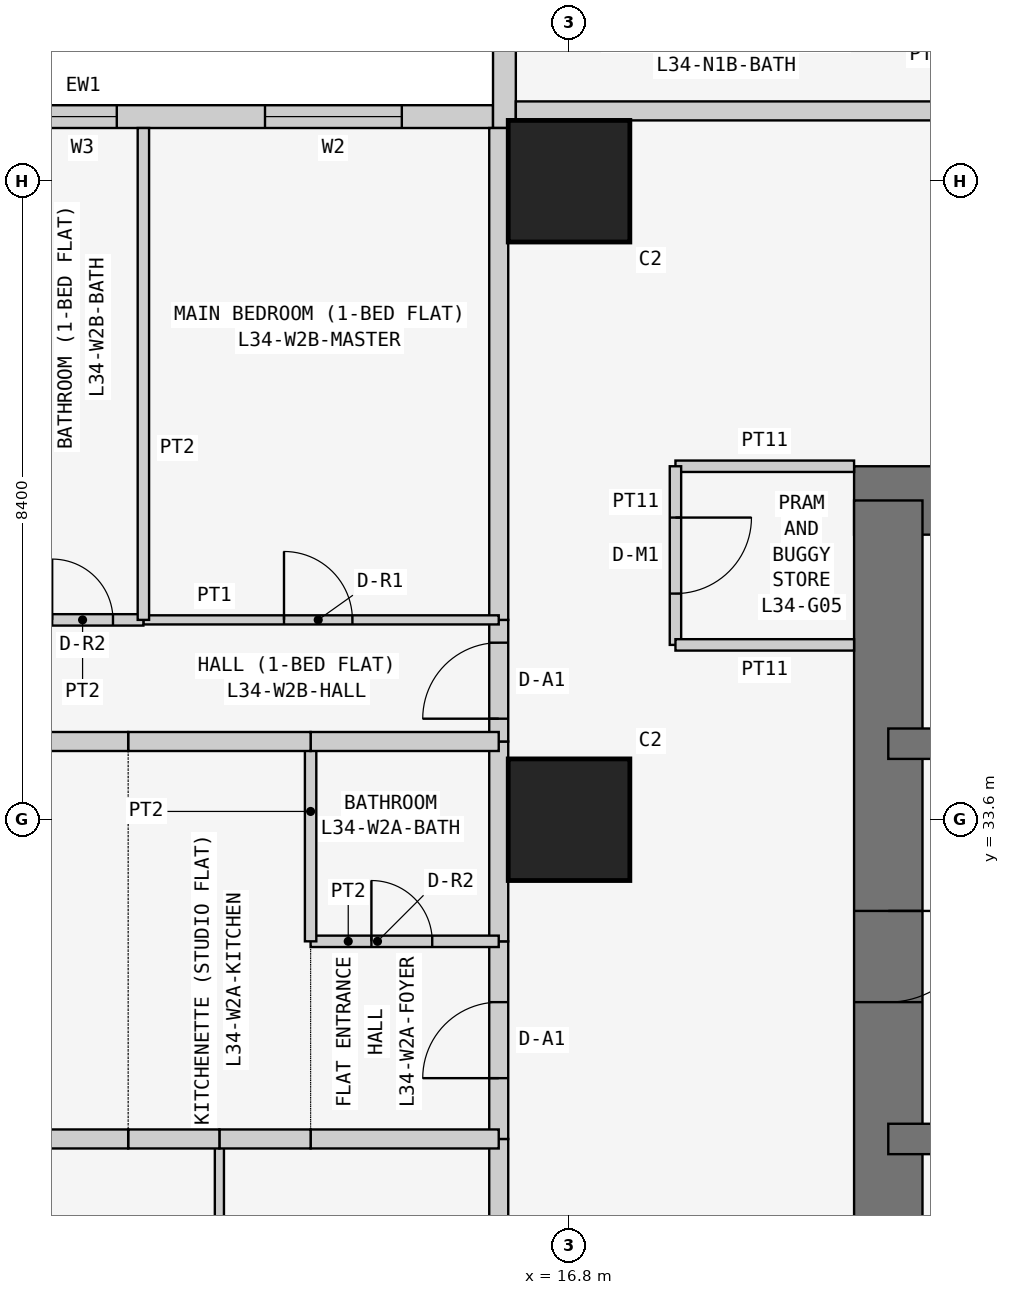
"""IFC4 building model, lengths in metres.
Left out: names, types, materials, properties, quantities, classifications, styles, units other than length and angle.
Written with IfcOpenShell. Run it as: python <this file> out.ifc"""

import sys

from ifc_helpers import new_model, si_unit, direction, frame, frame_2d, origin, origin_2d, place, context, subcontext, project, spatial, rectangle, extrude, element, fill, save


model = new_model("IFC4")
c1 = context("Model", 3, precision=1e-05, world=origin(), true_north=direction((0.0, 1.0)))
c2 = subcontext(c1, "Body", "Model", "MODEL_VIEW")
j1 = project(units=[si_unit("LENGTHUNIT", "METRE"), si_unit("PLANEANGLEUNIT", "RADIAN")], contexts=[c1])
p1 = place(None, origin())
s1 = spatial("IfcSite", under=j1, at=p1, CompositionType="ELEMENT")
p2 = place(p1, origin())
s2 = spatial("IfcBuilding", under=s1, at=p2, CompositionType="ELEMENT")
p3 = place(p2, frame((0.0, 0.0, 134.1)))
s3 = spatial("IfcBuildingStorey", under=s2, at=p3, CompositionType="ELEMENT", Elevation=134.1)
for number, where, z_axis, x_axis in (
    (1, (16.8, 33.6, 0.0), (0.0, 0.0, 1.0), (1.0, 0.0, 0.0)),
    (2, (16.8, 42.0, 0.0), (0.0, 0.0, 1.0), (1.0, 0.0, 0.0)),
):
    element("IfcColumn", number, at=place(p3, frame(where, z_axis=z_axis, x_axis=x_axis)), inside=s3, PredefinedType="COLUMN", context=c2, shape_type="SweptSolid", body=[
        extrude(rectangle(XDim=1.6, YDim=1.6, at=origin_2d()), origin(), (0.0, 0.0, 1.0), 3.6),
    ])
p4 = place(p3, frame((37.8, 37.8, 0.0), z_axis=(0.0, 0.0, 1.0), x_axis=(-1.0, 0.0, 0.0)))
e3 = element("IfcWall", 3, at=p4, inside=s3, PredefinedType="SHEAR", context=c2, shape_type="SweptSolid", body=[
    extrude(rectangle(XDim=17.25, YDim=0.9, at=frame_2d((8.625, 0.0))), origin(), (0.0, 0.0, 1.0), 3.6),
])
p5 = place(p3, frame((21.0, 37.8, 0.0), z_axis=(0.0, 0.0, 1.0), x_axis=(0.0, -1.0, 0.0)))
e4 = element("IfcWall", 4, at=p5, inside=s3, PredefinedType="SHEAR", context=c2, shape_type="SweptSolid", body=[
    extrude(rectangle(XDim=17.25, YDim=0.9, at=frame_2d((8.625, 0.0))), origin(), (0.0, 0.0, 1.0), 3.6),
])
p6 = place(p5, frame((5.4, 0.0, 0.0)))
e5 = element("IfcOpeningElement", 5, at=p6, cuts=e4, PredefinedType="OPENING", context=c2, shape_type="SweptSolid", body=[
    extrude(rectangle(XDim=1.2, YDim=2.1, at=frame_2d((0.6, 1.05))), frame((0.0, 0.46, 0.0), z_axis=(0.0, -1.0, 0.0), x_axis=(1.0, 0.0, 0.0)), (0.0, 0.0, 1.0), 0.92),
])
p7 = place(p3, frame((21.0, 29.4, 0.0), z_axis=(0.0, 0.0, 1.0), x_axis=(1.0, 0.0, 0.0)))
e6 = element("IfcWall", 6, at=p7, inside=s3, PredefinedType="SHEAR", context=c2, shape_type="SweptSolid", body=[
    extrude(rectangle(XDim=5.6, YDim=0.4, at=frame_2d((2.8, 0.0))), origin(), (0.0, 0.0, 1.0), 3.6),
])
p8 = place(p7, frame((2.3, 0.0, 0.0)))
e7 = element("IfcOpeningElement", 7, at=p8, cuts=e6, PredefinedType="OPENING", context=c2, shape_type="SweptSolid", body=[
    extrude(rectangle(XDim=1.2, YDim=2.1, at=frame_2d((0.6, 1.05))), frame((0.0, 0.21, 0.0), z_axis=(0.0, -1.0, 0.0), x_axis=(1.0, 0.0, 0.0)), (0.0, 0.0, 1.0), 0.42),
])
p9 = place(p3, frame((21.0, 34.6, 0.0), z_axis=(0.0, 0.0, 1.0), x_axis=(1.0, 0.0, 0.0)))
e8 = element("IfcWall", 8, at=p9, inside=s3, PredefinedType="SHEAR", context=c2, shape_type="SweptSolid", body=[
    extrude(rectangle(XDim=11.2, YDim=0.4, at=frame_2d((5.6, 0.0))), origin(), (0.0, 0.0, 1.0), 3.6),
])
p10 = place(p9, frame((9.35, 0.0, 0.0)))
e9 = element("IfcOpeningElement", 9, at=p10, cuts=e8, PredefinedType="OPENING", context=c2, shape_type="SweptSolid", body=[
    extrude(rectangle(XDim=0.9, YDim=2.1, at=frame_2d((0.45, 1.05))), frame((0.0, 0.21, 0.0), z_axis=(0.0, -1.0, 0.0), x_axis=(1.0, 0.0, 0.0)), (0.0, 0.0, 1.0), 0.42),
])
p11 = place(p9, frame((1.0, 0.0, 0.0)))
e10 = element("IfcOpeningElement", 10, at=p11, cuts=e8, PredefinedType="OPENING", context=c2, shape_type="SweptSolid", body=[
    extrude(rectangle(XDim=1.1, YDim=2.1, at=frame_2d((0.55, 1.05))), frame((0.0, 0.21, 0.0), z_axis=(0.0, -1.0, 0.0), x_axis=(1.0, 0.0, 0.0)), (0.0, 0.0, 1.0), 0.42),
])
p12 = place(p9, frame((3.65, 0.0, 0.0)))
e11 = element("IfcOpeningElement", 11, at=p12, cuts=e8, PredefinedType="OPENING", context=c2, shape_type="SweptSolid", body=[
    extrude(rectangle(XDim=1.1, YDim=2.1, at=frame_2d((0.55, 1.05))), frame((0.0, 0.21, 0.0), z_axis=(0.0, -1.0, 0.0), x_axis=(1.0, 0.0, 0.0)), (0.0, 0.0, 1.0), 0.42),
])
p13 = place(p9, frame((6.35, 0.0, 0.0)))
e12 = element("IfcOpeningElement", 12, at=p13, cuts=e8, PredefinedType="OPENING", context=c2, shape_type="SweptSolid", body=[
    extrude(rectangle(XDim=1.3, YDim=2.1, at=frame_2d((0.65, 1.05))), frame((0.0, 0.21, 0.0), z_axis=(0.0, -1.0, 0.0), x_axis=(1.0, 0.0, 0.0)), (0.0, 0.0, 1.0), 0.42),
])
p14 = place(p3, frame((15.8, 42.85, 0.0), z_axis=(0.0, 0.0, 1.0), x_axis=(-1.0, 0.0, 0.0)))
e13 = element("IfcWall", 13, at=p14, inside=s3, PredefinedType="SOLIDWALL", context=c2, shape_type="SweptSolid", body=[
    extrude(rectangle(XDim=15.4, YDim=0.3, at=frame_2d((7.7, 0.0))), origin(), (0.0, 0.0, 1.0), 3.45),
])
p15 = place(p14, frame((1.2, 0.0, 0.9)))
e14 = element("IfcOpeningElement", 14, at=p15, cuts=e13, PredefinedType="OPENING", context=c2, shape_type="SweptSolid", body=[
    extrude(rectangle(XDim=1.8, YDim=1.5, at=frame_2d((0.9, 0.75))), frame((0.0, 0.16, 0.0), z_axis=(0.0, -1.0, 0.0), x_axis=(1.0, 0.0, 0.0)), (0.0, 0.0, 1.0), 0.32),
])
p16 = place(p14, frame((4.95, 0.0, 1.5)))
e15 = element("IfcOpeningElement", 15, at=p16, cuts=e13, PredefinedType="OPENING", context=c2, shape_type="SweptSolid", body=[
    extrude(rectangle(XDim=0.9, YDim=0.7, at=frame_2d((0.45, 0.35))), frame((0.0, 0.16, 0.0), z_axis=(0.0, -1.0, 0.0), x_axis=(1.0, 0.0, 0.0)), (0.0, 0.0, 1.0), 0.32),
])
p17 = place(p14, frame((8.5, 0.0, 0.9)))
e16 = element("IfcOpeningElement", 16, at=p17, cuts=e13, PredefinedType="OPENING", context=c2, shape_type="SweptSolid", body=[
    extrude(rectangle(XDim=1.8, YDim=1.5, at=frame_2d((0.9, 0.75))), frame((0.0, 0.16, 0.0), z_axis=(0.0, -1.0, 0.0), x_axis=(1.0, 0.0, 0.0)), (0.0, 0.0, 1.0), 0.32),
])
p18 = place(p14, frame((12.5, 0.0, 0.0)))
e17 = element("IfcOpeningElement", 17, at=p18, cuts=e13, PredefinedType="OPENING", context=c2, shape_type="SweptSolid", body=[
    extrude(rectangle(XDim=0.9, YDim=2.4, at=frame_2d((0.45, 1.2))), frame((0.0, 0.16, 0.0), z_axis=(0.0, -1.0, 0.0), x_axis=(1.0, 0.0, 0.0)), (0.0, 0.0, 1.0), 0.32),
])
p19 = place(p14, frame((13.5, 0.0, 0.9)))
e18 = element("IfcOpeningElement", 18, at=p19, cuts=e13, PredefinedType="OPENING", context=c2, shape_type="SweptSolid", body=[
    extrude(rectangle(XDim=1.2, YDim=1.5, at=frame_2d((0.6, 0.75))), frame((0.0, 0.16, 0.0), z_axis=(0.0, -1.0, 0.0), x_axis=(1.0, 0.0, 0.0)), (0.0, 0.0, 1.0), 0.32),
])
p20 = place(p3, frame((15.95, 50.0, 0.0), z_axis=(0.0, 0.0, 1.0), x_axis=(0.0, -1.0, 0.0)))
e19 = element("IfcWall", 19, at=p20, inside=s3, PredefinedType="SOLIDWALL", context=c2, shape_type="SweptSolid", body=[
    extrude(rectangle(XDim=7.3, YDim=0.3, at=frame_2d((3.65, 0.0))), origin(), (0.0, 0.0, 1.0), 3.45),
])
p21 = place(p20, frame((3.1, 0.0, 0.9)))
e20 = element("IfcOpeningElement", 20, at=p21, cuts=e19, PredefinedType="OPENING", context=c2, shape_type="SweptSolid", body=[
    extrude(rectangle(XDim=2.4, YDim=1.5, at=frame_2d((1.2, 0.75))), frame((0.0, 0.16, 0.0), z_axis=(0.0, -1.0, 0.0), x_axis=(1.0, 0.0, 0.0)), (0.0, 0.0, 1.0), 0.32),
])
p22 = place(p20, frame((0.75, 0.0, 0.9)))
e21 = element("IfcOpeningElement", 21, at=p22, cuts=e19, PredefinedType="OPENING", context=c2, shape_type="SweptSolid", body=[
    extrude(rectangle(XDim=1.2, YDim=1.5, at=frame_2d((0.6, 0.75))), frame((0.0, 0.16, 0.0), z_axis=(0.0, -1.0, 0.0), x_axis=(1.0, 0.0, 0.0)), (0.0, 0.0, 1.0), 0.32),
])
p23 = place(p3, frame((20.55, 38.25, 0.0), z_axis=(0.0, 0.0, 1.0), x_axis=(-1.0, 0.0, 0.0)))
e22 = element("IfcWall", 22, at=p23, inside=s3, PredefinedType="PARTITIONING", context=c2, shape_type="SweptSolid", body=[
    extrude(rectangle(XDim=2.35, YDim=0.15, at=frame_2d((1.175, 0.0))), origin(), (0.0, 0.0, 1.0), 3.45),
])
p24 = place(p3, frame((18.2, 38.25, 0.0), z_axis=(0.0, 0.0, 1.0), x_axis=(0.0, -1.0, 0.0)))
e23 = element("IfcWall", 23, at=p24, inside=s3, PredefinedType="PARTITIONING", context=c2, shape_type="SweptSolid", body=[
    extrude(rectangle(XDim=2.35, YDim=0.15, at=frame_2d((1.175, 0.0))), origin(), (0.0, 0.0, 1.0), 3.45),
])
p25 = place(p24, frame((0.675, 0.0, 0.0)))
e24 = element("IfcOpeningElement", 24, at=p25, cuts=e23, PredefinedType="OPENING", context=c2, shape_type="SweptSolid", body=[
    extrude(rectangle(XDim=1.0, YDim=2.1, at=frame_2d((0.5, 1.05))), frame((0.0, 0.085, 0.0), z_axis=(0.0, -1.0, 0.0), x_axis=(1.0, 0.0, 0.0)), (0.0, 0.0, 1.0), 0.17),
])
p26 = place(p3, frame((18.2, 35.9, 0.0), z_axis=(0.0, 0.0, 1.0), x_axis=(1.0, 0.0, 0.0)))
e25 = element("IfcWall", 25, at=p26, inside=s3, PredefinedType="PARTITIONING", context=c2, shape_type="SweptSolid", body=[
    extrude(rectangle(XDim=2.35, YDim=0.15, at=frame_2d((1.175, 0.0))), origin(), (0.0, 0.0, 1.0), 3.45),
])
p27 = place(p3, frame((16.1, 42.925, 0.0), z_axis=(0.0, 0.0, 1.0), x_axis=(1.0, 0.0, 0.0)))
e26 = element("IfcWall", 26, at=p27, inside=s3, PredefinedType="PARTITIONING", context=c2, shape_type="SweptSolid", body=[
    extrude(rectangle(XDim=6.471, YDim=0.25, at=frame_2d((3.235, 0.0))), origin(), (0.0, 0.0, 1.0), 3.45),
])
p28 = place(p3, frame((15.875, 24.171, 0.0), z_axis=(0.0, 0.0, 1.0), x_axis=(0.0, 1.0, 0.0)))
e27 = element("IfcWall", 27, at=p28, inside=s3, PredefinedType="PARTITIONING", context=c2, shape_type="SweptSolid", body=[
    extrude(rectangle(XDim=5.229, YDim=0.25, at=frame_2d((2.615, 0.0))), origin(), (0.0, 0.0, 1.0), 3.45),
])
p29 = place(p28, frame((2.129, 0.0, 0.0)))
e28 = element("IfcOpeningElement", 28, at=p29, cuts=e27, PredefinedType="OPENING", context=c2, shape_type="SweptSolid", body=[
    extrude(rectangle(XDim=1.0, YDim=2.1, at=frame_2d((0.5, 1.05))), frame((0.0, 0.135, 0.0), z_axis=(0.0, -1.0, 0.0), x_axis=(1.0, 0.0, 0.0)), (0.0, 0.0, 1.0), 0.27),
])
p30 = place(p3, frame((15.875, 29.4, 0.0), z_axis=(0.0, 0.0, 1.0), x_axis=(0.0, 1.0, 0.0)))
e29 = element("IfcWall", 29, at=p30, inside=s3, PredefinedType="PARTITIONING", context=c2, shape_type="SweptSolid", body=[
    extrude(rectangle(XDim=2.6, YDim=0.25, at=frame_2d((1.3, 0.0))), origin(), (0.0, 0.0, 1.0), 3.45),
])
p31 = place(p30, frame((0.8, 0.0, 0.0)))
e30 = element("IfcOpeningElement", 30, at=p31, cuts=e29, PredefinedType="OPENING", context=c2, shape_type="SweptSolid", body=[
    extrude(rectangle(XDim=1.0, YDim=2.1, at=frame_2d((0.5, 1.05))), frame((0.0, 0.135, 0.0), z_axis=(0.0, -1.0, 0.0), x_axis=(1.0, 0.0, 0.0)), (0.0, 0.0, 1.0), 0.27),
])
p32 = place(p3, frame((15.875, 32.0, 0.0), z_axis=(0.0, 0.0, 1.0), x_axis=(0.0, 1.0, 0.0)))
e31 = element("IfcWall", 31, at=p32, inside=s3, PredefinedType="PARTITIONING", context=c2, shape_type="SweptSolid", body=[
    extrude(rectangle(XDim=2.629, YDim=0.25, at=frame_2d((1.314, 0.0))), origin(), (0.0, 0.0, 1.0), 3.45),
])
p33 = place(p3, frame((15.875, 34.629, 0.0), z_axis=(0.0, 0.0, 1.0), x_axis=(0.0, 1.0, 0.0)))
e32 = element("IfcWall", 32, at=p33, inside=s3, PredefinedType="PARTITIONING", context=c2, shape_type="SweptSolid", body=[
    extrude(rectangle(XDim=1.6, YDim=0.25, at=frame_2d((0.8, 0.0))), origin(), (0.0, 0.0, 1.0), 3.45),
])
p34 = place(p33, frame((0.3, 0.0, 0.0)))
e33 = element("IfcOpeningElement", 33, at=p34, cuts=e32, PredefinedType="OPENING", context=c2, shape_type="SweptSolid", body=[
    extrude(rectangle(XDim=1.0, YDim=2.1, at=frame_2d((0.5, 1.05))), frame((0.0, 0.135, 0.0), z_axis=(0.0, -1.0, 0.0), x_axis=(1.0, 0.0, 0.0)), (0.0, 0.0, 1.0), 0.27),
])
p35 = place(p3, frame((15.875, 36.229, 0.0), z_axis=(0.0, 0.0, 1.0), x_axis=(0.0, 1.0, 0.0)))
e34 = element("IfcWall", 34, at=p35, inside=s3, PredefinedType="PARTITIONING", context=c2, shape_type="SweptSolid", body=[
    extrude(rectangle(XDim=6.471, YDim=0.25, at=frame_2d((3.235, 0.0))), origin(), (0.0, 0.0, 1.0), 3.45),
])
p36 = place(p3, frame((12.2, 29.4, 0.0), z_axis=(0.0, 0.0, 1.0), x_axis=(0.0, -1.0, 0.0)))
e35 = element("IfcWall", 35, at=p36, inside=s3, PredefinedType="PARTITIONING", context=c2, shape_type="SweptSolid", body=[
    extrude(rectangle(XDim=5.229, YDim=0.12, at=frame_2d((2.615, 0.0))), origin(), (0.0, 0.0, 1.0), 3.45),
])
p37 = place(p3, frame((15.875, 29.4, 0.0), z_axis=(0.0, 0.0, 1.0), x_axis=(-1.0, 0.0, 0.0)))
e36 = element("IfcWall", 36, at=p37, inside=s3, PredefinedType="PARTITIONING", context=c2, shape_type="SweptSolid", body=[
    extrude(rectangle(XDim=2.475, YDim=0.25, at=frame_2d((1.238, 0.0))), origin(), (0.0, 0.0, 1.0), 3.45),
])
for number, where, z_axis, x_axis in (
    (37, (13.4, 29.4, 0.0), (0.0, 0.0, 1.0), (-1.0, 0.0, 0.0)),
    (38, (12.2, 29.4, 0.0), (0.0, 0.0, 1.0), (-1.0, 0.0, 0.0)),
    (39, (11.0, 29.4, 0.0), (0.0, 0.0, 1.0), (-1.0, 0.0, 0.0)),
):
    element("IfcWall", number, at=place(p3, frame(where, z_axis=z_axis, x_axis=x_axis)), inside=s3, PredefinedType="PARTITIONING", context=c2, shape_type="SweptSolid", body=[
        extrude(rectangle(XDim=1.2, YDim=0.25, at=frame_2d((0.6, 0.0))), origin(), (0.0, 0.0, 1.0), 3.45),
    ])
p38 = place(p3, frame((13.4, 32.0, 0.0), z_axis=(0.0, 0.0, 1.0), x_axis=(1.0, 0.0, 0.0)))
e40 = element("IfcWall", 40, at=p38, inside=s3, PredefinedType="PARTITIONING", context=c2, shape_type="SweptSolid", body=[
    extrude(rectangle(XDim=2.475, YDim=0.15, at=frame_2d((1.238, 0.0))), origin(), (0.0, 0.0, 1.0), 3.45),
])
p39 = place(p38, frame((0.8, 0.0, 0.0)))
e41 = element("IfcOpeningElement", 41, at=p39, cuts=e40, PredefinedType="OPENING", context=c2, shape_type="SweptSolid", body=[
    extrude(rectangle(XDim=0.8, YDim=2.1, at=frame_2d((0.4, 1.05))), frame((0.0, 0.085, 0.0), z_axis=(0.0, -1.0, 0.0), x_axis=(1.0, 0.0, 0.0)), (0.0, 0.0, 1.0), 0.17),
])
p40 = place(p3, frame((13.4, 32.0, 0.0), z_axis=(0.0, 0.0, 1.0), x_axis=(0.0, 1.0, 0.0)))
e42 = element("IfcWall", 42, at=p40, inside=s3, PredefinedType="PARTITIONING", context=c2, shape_type="SweptSolid", body=[
    extrude(rectangle(XDim=2.629, YDim=0.15, at=frame_2d((1.314, 0.0))), origin(), (0.0, 0.0, 1.0), 3.45),
])
p41 = place(p3, frame((13.4, 34.629, 0.0), z_axis=(0.0, 0.0, 1.0), x_axis=(1.0, 0.0, 0.0)))
e43 = element("IfcWall", 43, at=p41, inside=s3, PredefinedType="PARTITIONING", context=c2, shape_type="SweptSolid", body=[
    extrude(rectangle(XDim=2.475, YDim=0.25, at=frame_2d((1.238, 0.0))), origin(), (0.0, 0.0, 1.0), 3.45),
])
p42 = place(p3, frame((11.0, 34.629, 0.0), z_axis=(0.0, 0.0, 1.0), x_axis=(1.0, 0.0, 0.0)))
e44 = element("IfcWall", 44, at=p42, inside=s3, PredefinedType="PARTITIONING", context=c2, shape_type="SweptSolid", body=[
    extrude(rectangle(XDim=2.4, YDim=0.25, at=frame_2d((1.2, 0.0))), origin(), (0.0, 0.0, 1.0), 3.45),
])
p43 = place(p3, frame((3.5, 34.629, 0.0), z_axis=(0.0, 0.0, 1.0), x_axis=(1.0, 0.0, 0.0)))
e45 = element("IfcWall", 45, at=p43, inside=s3, PredefinedType="PARTITIONING", context=c2, shape_type="SweptSolid", body=[
    extrude(rectangle(XDim=7.5, YDim=0.25, at=frame_2d((3.75, 0.0))), origin(), (0.0, 0.0, 1.0), 3.45),
])
p44 = place(p3, frame((11.2, 36.229, 0.0), z_axis=(0.0, 0.0, 1.0), x_axis=(1.0, 0.0, 0.0)))
e46 = element("IfcWall", 46, at=p44, inside=s3, PredefinedType="PARTITIONING", context=c2, shape_type="SweptSolid", body=[
    extrude(rectangle(XDim=4.675, YDim=0.12, at=frame_2d((2.337, 0.0))), origin(), (0.0, 0.0, 1.0), 3.45),
])
p45 = place(p44, frame((1.85, 0.0, 0.0)))
e47 = element("IfcOpeningElement", 47, at=p45, cuts=e46, PredefinedType="OPENING", context=c2, shape_type="SweptSolid", body=[
    extrude(rectangle(XDim=0.9, YDim=2.1, at=frame_2d((0.45, 1.05))), frame((0.0, 0.07, 0.0), z_axis=(0.0, -1.0, 0.0), x_axis=(1.0, 0.0, 0.0)), (0.0, 0.0, 1.0), 0.14),
])
p46 = place(p3, frame((9.6, 36.229, 0.0), z_axis=(0.0, 0.0, 1.0), x_axis=(1.0, 0.0, 0.0)))
e48 = element("IfcWall", 48, at=p46, inside=s3, PredefinedType="PARTITIONING", context=c2, shape_type="SweptSolid", body=[
    extrude(rectangle(XDim=1.6, YDim=0.15, at=frame_2d((0.8, 0.0))), origin(), (0.0, 0.0, 1.0), 3.45),
])
p47 = place(p46, frame((0.4, 0.0, 0.0)))
e49 = element("IfcOpeningElement", 49, at=p47, cuts=e48, PredefinedType="OPENING", context=c2, shape_type="SweptSolid", body=[
    extrude(rectangle(XDim=0.8, YDim=2.1, at=frame_2d((0.4, 1.05))), frame((0.0, 0.085, 0.0), z_axis=(0.0, -1.0, 0.0), x_axis=(1.0, 0.0, 0.0)), (0.0, 0.0, 1.0), 0.17),
])
p48 = place(p3, frame((11.2, 36.229, 0.0), z_axis=(0.0, 0.0, 1.0), x_axis=(0.0, 1.0, 0.0)))
e50 = element("IfcWall", 50, at=p48, inside=s3, PredefinedType="PARTITIONING", context=c2, shape_type="SweptSolid", body=[
    extrude(rectangle(XDim=6.471, YDim=0.15, at=frame_2d((3.235, 0.0))), origin(), (0.0, 0.0, 1.0), 3.45),
])
p49 = place(p15, origin())
e51 = element("IfcWindow", 51, at=p49, inside=s3, PartitioningType="SINGLE_PANEL", PredefinedType="WINDOW", context=c2, shape_type="SweptSolid", body=[
    extrude(rectangle(XDim=1.8, YDim=1.5, at=frame_2d((0.9, 0.75))), frame((0.0, 0.03, 0.0), z_axis=(0.0, -1.0, 0.0), x_axis=(1.0, 0.0, 0.0)), (0.0, 0.0, 1.0), 0.06),
])
fill(e14, e51)
p50 = place(p16, origin())
e52 = element("IfcWindow", 52, at=p50, inside=s3, PartitioningType="SINGLE_PANEL", PredefinedType="WINDOW", context=c2, shape_type="SweptSolid", body=[
    extrude(rectangle(XDim=0.9, YDim=0.7, at=frame_2d((0.45, 0.35))), frame((0.0, 0.03, 0.0), z_axis=(0.0, -1.0, 0.0), x_axis=(1.0, 0.0, 0.0)), (0.0, 0.0, 1.0), 0.06),
])
fill(e15, e52)
p51 = place(p25, origin())
e53 = element("IfcDoor", 53, at=p51, inside=s3, OperationType="SINGLE_SWING_LEFT", PredefinedType="DOOR", context=c2, shape_type="SweptSolid", body=[
    extrude(rectangle(XDim=1.0, YDim=2.1, at=frame_2d((0.5, 1.05))), frame((0.0, 0.025, 0.0), z_axis=(0.0, -1.0, 0.0), x_axis=(1.0, 0.0, 0.0)), (0.0, 0.0, 1.0), 0.05),
])
fill(e24, e53)
p52 = place(p31, origin())
e54 = element("IfcDoor", 54, at=p52, inside=s3, OperationType="SINGLE_SWING_LEFT", PredefinedType="DOOR", context=c2, shape_type="SweptSolid", body=[
    extrude(rectangle(XDim=1.0, YDim=2.1, at=frame_2d((0.5, 1.05))), frame((0.0, 0.025, 0.0), z_axis=(0.0, -1.0, 0.0), x_axis=(1.0, 0.0, 0.0)), (0.0, 0.0, 1.0), 0.05),
])
fill(e30, e54)
p53 = place(p39, origin())
e55 = element("IfcDoor", 55, at=p53, inside=s3, OperationType="SINGLE_SWING_LEFT", PredefinedType="DOOR", context=c2, shape_type="SweptSolid", body=[
    extrude(rectangle(XDim=0.8, YDim=2.1, at=frame_2d((0.4, 1.05))), frame((0.0, 0.025, 0.0), z_axis=(0.0, -1.0, 0.0), x_axis=(1.0, 0.0, 0.0)), (0.0, 0.0, 1.0), 0.05),
])
fill(e41, e55)
p54 = place(p34, origin())
e56 = element("IfcDoor", 56, at=p54, inside=s3, OperationType="SINGLE_SWING_LEFT", PredefinedType="DOOR", context=c2, shape_type="SweptSolid", body=[
    extrude(rectangle(XDim=1.0, YDim=2.1, at=frame_2d((0.5, 1.05))), frame((0.0, 0.025, 0.0), z_axis=(0.0, -1.0, 0.0), x_axis=(1.0, 0.0, 0.0)), (0.0, 0.0, 1.0), 0.05),
])
fill(e33, e56)
p55 = place(p45, origin())
e57 = element("IfcDoor", 57, at=p55, inside=s3, OperationType="SINGLE_SWING_LEFT", PredefinedType="DOOR", context=c2, shape_type="SweptSolid", body=[
    extrude(rectangle(XDim=0.9, YDim=2.1, at=frame_2d((0.45, 1.05))), frame((0.0, 0.025, 0.0), z_axis=(0.0, -1.0, 0.0), x_axis=(1.0, 0.0, 0.0)), (0.0, 0.0, 1.0), 0.05),
])
fill(e47, e57)
p56 = place(p47, origin())
e58 = element("IfcDoor", 58, at=p56, inside=s3, OperationType="SINGLE_SWING_LEFT", PredefinedType="DOOR", context=c2, shape_type="SweptSolid", body=[
    extrude(rectangle(XDim=0.8, YDim=2.1, at=frame_2d((0.4, 1.05))), frame((0.0, 0.025, 0.0), z_axis=(0.0, -1.0, 0.0), x_axis=(1.0, 0.0, 0.0)), (0.0, 0.0, 1.0), 0.05),
])
fill(e49, e58)
p57 = place(p6, origin())
e59 = element("IfcDoor", 59, at=p57, inside=s3, OperationType="SINGLE_SWING_LEFT", PredefinedType="DOOR", context=c2, shape_type="SweptSolid", body=[
    extrude(rectangle(XDim=1.2, YDim=2.1, at=frame_2d((0.6, 1.05))), frame((0.0, 0.025, 0.0), z_axis=(0.0, -1.0, 0.0), x_axis=(1.0, 0.0, 0.0)), (0.0, 0.0, 1.0), 0.05),
])
fill(e5, e59)
save(model, sys.argv[1])
